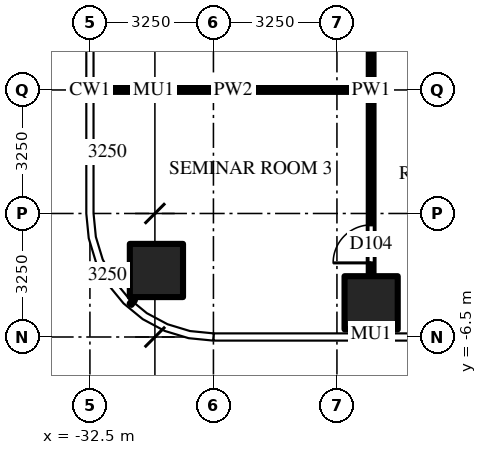
"""IFC4 building model, lengths in metres.
Left out: names, types, materials, properties, quantities, classifications, styles, units other than length and angle.
Written with IfcOpenShell. Run it as: python <this file> out.ifc"""

import sys

from ifc_helpers import new_model, si_unit, direction, frame, frame_2d, origin, origin_2d, place, context, subcontext, project, spatial, rectangle, extrude, source, transform, mapped, element, fill, save


model = new_model("IFC4")
c1 = context("Model", 3, precision=1e-05, world=origin(), true_north=direction((0.0, 1.0)))
c2 = subcontext(c1, "Body", "Model", "MODEL_VIEW")
j1 = project(units=[si_unit("LENGTHUNIT", "METRE"), si_unit("PLANEANGLEUNIT", "RADIAN")], contexts=[c1])
p1 = place(None, origin())
s1 = spatial("IfcSite", under=j1, at=p1, CompositionType="ELEMENT")
p2 = place(p1, origin())
s2 = spatial("IfcBuilding", under=s1, at=p2, CompositionType="ELEMENT")
p3 = place(p2, frame((0.0, 0.0, 61.0)))
s3 = spatial("IfcBuildingStorey", under=s2, at=p3, CompositionType="ELEMENT", Elevation=61.0)
m1 = source(origin(), c2, "Body", "SweptSolid", [
    extrude(rectangle(XDim=1.4, YDim=1.4, at=origin_2d()), origin(), (0.0, 0.0, 1.0), 4.5),
])
for number, where, z_axis, x_axis in (
    (1, (-25.1, -5.6, 0.0), (0.0, 0.0, 1.0), (1.0, 0.0, 0.0)),
    (2, (-30.75, -4.75, 0.0), (0.0, 0.0, 1.0), (1.0, 0.0, 0.0)),
):
    element("IfcColumn", number, at=place(p3, frame(where, z_axis=z_axis, x_axis=x_axis)), inside=s3, PredefinedType="COLUMN", context=c2, shape_type="MappedRepresentation", body=[
        mapped(m1, transform((0.0, 0.0, 0.0))),
    ])
m2 = source(origin(), c2, "Body", "SweptSolid", [
    extrude(rectangle(XDim=9.8, YDim=0.125, at=frame_2d((4.9, 0.0))), origin(), (0.0, 0.0, 1.0), 3.468),
])
p4 = place(p3, frame((-25.1, -4.9, 0.0), z_axis=(0.0, 0.0, 1.0), x_axis=(0.0, 1.0, 0.0)))
e3 = element("IfcWall", 3, at=p4, inside=s3, PredefinedType="PARTITIONING", context=c2, shape_type="MappedRepresentation", body=[
    mapped(m2, transform((0.0, 0.0, 0.0))),
])
m3 = source(origin(), c2, "Body", "SweptSolid", [
    extrude(rectangle(XDim=1.0, YDim=2.1, at=frame_2d((0.5, 1.05))), frame((0.0, 0.073, 0.0), z_axis=(0.0, -1.0, 0.0), x_axis=(1.0, 0.0, 0.0)), (0.0, 0.0, 1.0), 0.145),
])
p5 = place(p4, frame((0.35, 0.0, 0.0)))
e4 = element("IfcOpeningElement", 4, at=p5, cuts=e3, PredefinedType="OPENING", context=c2, shape_type="MappedRepresentation", body=[
    mapped(m3, transform((0.0, 0.0, 0.0))),
])
p6 = place(p4, frame((8.45, 0.0, 0.0)))
e5 = element("IfcOpeningElement", 5, at=p6, cuts=e3, PredefinedType="OPENING", context=c2, shape_type="MappedRepresentation", body=[
    mapped(m3, transform((0.0, 0.0, 0.0))),
])
m4 = source(origin(), c2, "Body", "SweptSolid", [
    extrude(rectangle(XDim=7.137, YDim=0.1, at=frame_2d((3.569, 0.0))), origin(), (0.0, 0.0, 1.0), 3.33),
])
p7 = place(p3, frame((-32.3, 0.0, 0.0), z_axis=(0.0, 0.0, 1.0), x_axis=(1.0, 0.0, 0.0)))
e6 = element("IfcWall", 6, at=p7, inside=s3, PredefinedType="PARTITIONING", context=c2, shape_type="MappedRepresentation", body=[
    mapped(m4, transform((0.0, 0.0, 0.0))),
])
m5 = source(origin(), c2, "Body", "SweptSolid", [
    extrude(rectangle(XDim=1.0, YDim=2.1, at=frame_2d((0.5, 1.05))), frame((0.0, 0.025, 0.0), z_axis=(0.0, -1.0, 0.0), x_axis=(1.0, 0.0, 0.0)), (0.0, 0.0, 1.0), 0.05),
])
p8 = place(p5, origin())
e7 = element("IfcDoor", 7, at=p8, inside=s3, OperationType="SINGLE_SWING_LEFT", PredefinedType="DOOR", context=c2, shape_type="MappedRepresentation", body=[
    mapped(m5, transform((0.0, 0.0, 0.0))),
])
fill(e4, e7)
save(model, sys.argv[1])
